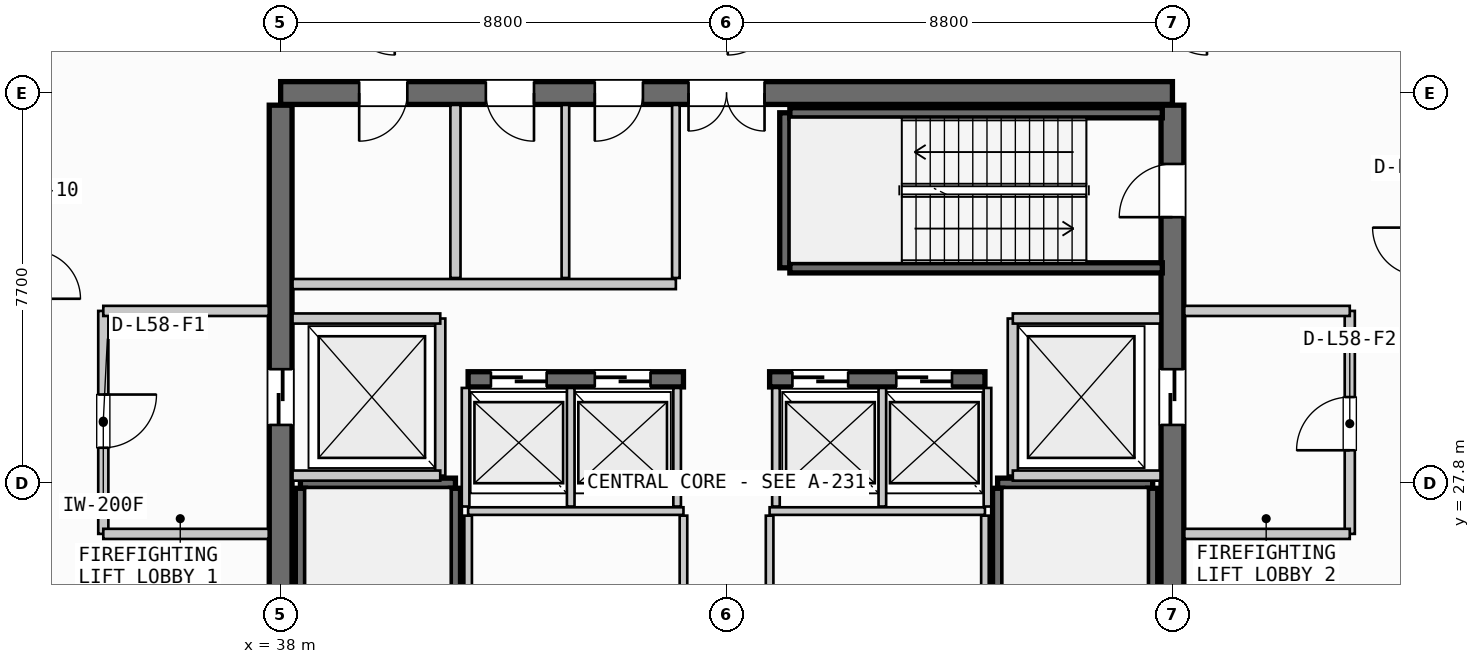
"""IFC4 building model, lengths in metres.
Left out: names, types, materials, properties, quantities, classifications, styles, units other than length and angle.
Written with IfcOpenShell. Run it as: python <this file> out.ifc"""

import sys

from ifc_helpers import new_model, si_unit, direction, frame, frame_2d, origin, place, context, subcontext, project, spatial, rectangle, extrude, source, transform, mapped, element, fill, save


model = new_model("IFC4")
c1 = context("Model", 3, precision=1e-05, world=origin(), true_north=direction((0.0, 1.0)))
c2 = subcontext(c1, "Body", "Model", "MODEL_VIEW")
j1 = project(units=[si_unit("LENGTHUNIT", "METRE"), si_unit("PLANEANGLEUNIT", "RADIAN")], contexts=[c1])
p1 = place(None, origin())
s1 = spatial("IfcSite", under=j1, at=p1, CompositionType="ELEMENT")
p2 = place(p1, origin())
s2 = spatial("IfcBuilding", under=s1, at=p2, CompositionType="ELEMENT")
p3 = place(p2, frame((0.0, 0.0, 223.6)))
s3 = spatial("IfcBuildingStorey", under=s2, at=p3, CompositionType="ELEMENT", Elevation=223.6)
p4 = place(p3, frame((55.6, 35.5, 0.0), z_axis=(0.0, 0.0, 1.0), x_axis=(-1.0, 0.0, 0.0)))
e1 = element("IfcWall", 1, at=p4, inside=s3, PredefinedType="SHEAR", context=c2, shape_type="SweptSolid", body=[
    extrude(rectangle(XDim=17.6, YDim=0.45, at=frame_2d((8.8, 0.0))), origin(), (0.0, 0.0, 1.0), 4.38),
])
p5 = place(p4, frame((8.05, 0.0, 0.0)))
e2 = element("IfcOpeningElement", 2, at=p5, cuts=e1, PredefinedType="OPENING", context=c2, shape_type="SweptSolid", body=[
    extrude(rectangle(XDim=1.5, YDim=2.2, at=frame_2d((0.75, 1.1))), frame((0.0, 0.235, 0.0), z_axis=(0.0, -1.0, 0.0), x_axis=(1.0, 0.0, 0.0)), (0.0, 0.0, 1.0), 0.47),
])
p6 = place(p4, frame((15.1, 0.0, 0.0)))
e3 = element("IfcOpeningElement", 3, at=p6, cuts=e1, PredefinedType="OPENING", context=c2, shape_type="SweptSolid", body=[
    extrude(rectangle(XDim=0.95, YDim=2.15, at=frame_2d((0.475, 1.075))), frame((0.0, 0.235, 0.0), z_axis=(0.0, -1.0, 0.0), x_axis=(1.0, 0.0, 0.0)), (0.0, 0.0, 1.0), 0.47),
])
p7 = place(p4, frame((12.6, 0.0, 0.0)))
e4 = element("IfcOpeningElement", 4, at=p7, cuts=e1, PredefinedType="OPENING", context=c2, shape_type="SweptSolid", body=[
    extrude(rectangle(XDim=0.95, YDim=2.15, at=frame_2d((0.475, 1.075))), frame((0.0, 0.235, 0.0), z_axis=(0.0, -1.0, 0.0), x_axis=(1.0, 0.0, 0.0)), (0.0, 0.0, 1.0), 0.47),
])
p8 = place(p4, frame((10.45, 0.0, 0.0)))
e5 = element("IfcOpeningElement", 5, at=p8, cuts=e1, PredefinedType="OPENING", context=c2, shape_type="SweptSolid", body=[
    extrude(rectangle(XDim=0.95, YDim=2.15, at=frame_2d((0.475, 1.075))), frame((0.0, 0.235, 0.0), z_axis=(0.0, -1.0, 0.0), x_axis=(1.0, 0.0, 0.0)), (0.0, 0.0, 1.0), 0.47),
])
p9 = place(p3, frame((38.0, 35.26, 0.0), z_axis=(0.0, 0.0, 1.0), x_axis=(0.0, -1.0, 0.0)))
e6 = element("IfcWall", 6, at=p9, inside=s3, PredefinedType="SHEAR", context=c2, shape_type="SweptSolid", body=[
    extrude(rectangle(XDim=14.92, YDim=0.45, at=frame_2d((7.46, 0.0))), origin(), (0.0, 0.0, 1.0), 4.38),
])
p10 = place(p9, frame((5.21, 0.0, 0.0)))
e7 = element("IfcOpeningElement", 7, at=p10, cuts=e6, PredefinedType="OPENING", context=c2, shape_type="SweptSolid", body=[
    extrude(rectangle(XDim=1.1, YDim=2.2, at=frame_2d((0.55, 1.1))), frame((0.0, 0.235, 0.0), z_axis=(0.0, -1.0, 0.0), x_axis=(1.0, 0.0, 0.0)), (0.0, 0.0, 1.0), 0.47),
])
p11 = place(p3, frame((55.6, 20.34, 0.0), z_axis=(0.0, 0.0, 1.0), x_axis=(0.0, 1.0, 0.0)))
e8 = element("IfcWall", 8, at=p11, inside=s3, PredefinedType="SHEAR", context=c2, shape_type="SweptSolid", body=[
    extrude(rectangle(XDim=14.92, YDim=0.45, at=frame_2d((7.46, 0.0))), origin(), (0.0, 0.0, 1.0), 4.38),
])
p12 = place(p11, frame((12.71, 0.0, 0.0)))
e9 = element("IfcOpeningElement", 9, at=p12, cuts=e8, PredefinedType="OPENING", context=c2, shape_type="SweptSolid", body=[
    extrude(rectangle(XDim=1.05, YDim=2.15, at=frame_2d((0.525, 1.075))), frame((0.0, 0.235, 0.0), z_axis=(0.0, -1.0, 0.0), x_axis=(1.0, 0.0, 0.0)), (0.0, 0.0, 1.0), 0.47),
])
p13 = place(p11, frame((8.61, 0.0, 0.0)))
e10 = element("IfcOpeningElement", 10, at=p13, cuts=e8, PredefinedType="OPENING", context=c2, shape_type="SweptSolid", body=[
    extrude(rectangle(XDim=1.1, YDim=2.2, at=frame_2d((0.55, 1.1))), frame((0.0, 0.235, 0.0), z_axis=(0.0, -1.0, 0.0), x_axis=(1.0, 0.0, 0.0)), (0.0, 0.0, 1.0), 0.47),
])
p14 = place(p3, frame((41.7, 29.85, 0.0), z_axis=(0.0, 0.0, 1.0), x_axis=(1.0, 0.0, 0.0)))
e11 = element("IfcWall", 11, at=p14, inside=s3, PredefinedType="SHEAR", context=c2, shape_type="SweptSolid", body=[
    extrude(rectangle(XDim=4.25, YDim=0.3, at=frame_2d((2.125, 0.0))), origin(), (0.0, 0.0, 1.0), 4.38),
])
p15 = place(p14, frame((0.45, 0.0, 0.0)))
e12 = element("IfcOpeningElement", 12, at=p15, cuts=e11, PredefinedType="OPENING", context=c2, shape_type="SweptSolid", body=[
    extrude(rectangle(XDim=1.1, YDim=2.2, at=frame_2d((0.55, 1.1))), frame((0.0, 0.16, 0.0), z_axis=(0.0, -1.0, 0.0), x_axis=(1.0, 0.0, 0.0)), (0.0, 0.0, 1.0), 0.32),
])
p16 = place(p14, frame((2.5, 0.0, 0.0)))
e13 = element("IfcOpeningElement", 13, at=p16, cuts=e11, PredefinedType="OPENING", context=c2, shape_type="SweptSolid", body=[
    extrude(rectangle(XDim=1.1, YDim=2.2, at=frame_2d((0.55, 1.1))), frame((0.0, 0.16, 0.0), z_axis=(0.0, -1.0, 0.0), x_axis=(1.0, 0.0, 0.0)), (0.0, 0.0, 1.0), 0.32),
])
p17 = place(p3, frame((47.65, 29.85, 0.0), z_axis=(0.0, 0.0, 1.0), x_axis=(1.0, 0.0, 0.0)))
e14 = element("IfcWall", 14, at=p17, inside=s3, PredefinedType="SHEAR", context=c2, shape_type="SweptSolid", body=[
    extrude(rectangle(XDim=4.25, YDim=0.3, at=frame_2d((2.125, 0.0))), origin(), (0.0, 0.0, 1.0), 4.38),
])
p18 = place(p17, frame((0.45, 0.0, 0.0)))
e15 = element("IfcOpeningElement", 15, at=p18, cuts=e14, PredefinedType="OPENING", context=c2, shape_type="SweptSolid", body=[
    extrude(rectangle(XDim=1.1, YDim=2.2, at=frame_2d((0.55, 1.1))), frame((0.0, 0.16, 0.0), z_axis=(0.0, -1.0, 0.0), x_axis=(1.0, 0.0, 0.0)), (0.0, 0.0, 1.0), 0.32),
])
p19 = place(p17, frame((2.5, 0.0, 0.0)))
e16 = element("IfcOpeningElement", 16, at=p19, cuts=e14, PredefinedType="OPENING", context=c2, shape_type="SweptSolid", body=[
    extrude(rectangle(XDim=1.1, YDim=2.2, at=frame_2d((0.55, 1.1))), frame((0.0, 0.16, 0.0), z_axis=(0.0, -1.0, 0.0), x_axis=(1.0, 0.0, 0.0)), (0.0, 0.0, 1.0), 0.32),
])
p20 = place(p3, frame((38.39, 27.8, 0.0), z_axis=(0.0, 0.0, 1.0), x_axis=(1.0, 0.0, 0.0)))
e17 = element("IfcWall", 17, at=p20, inside=s3, PredefinedType="SHEAR", context=c2, shape_type="SweptSolid", body=[
    extrude(rectangle(XDim=3.06, YDim=0.2, at=frame_2d((1.53, 0.0))), origin(), (0.0, 0.0, 1.0), 4.38),
])
for number, where, z_axis, x_axis in (
    (18, (41.45, 27.7, 0.0), (0.0, 0.0, 1.0), (0.0, -1.0, 0.0)),
    (19, (38.39, 20.35, 0.0), (0.0, 0.0, 1.0), (0.0, 1.0, 0.0)),
):
    element("IfcWall", number, at=place(p3, frame(where, z_axis=z_axis, x_axis=x_axis)), inside=s3, PredefinedType="SHEAR", context=c2, shape_type="SweptSolid", body=[
        extrude(rectangle(XDim=7.35, YDim=0.2, at=frame_2d((3.675, 0.0))), origin(), (0.0, 0.0, 1.0), 4.38),
    ])
p21 = place(p3, frame((52.15, 27.8, 0.0), z_axis=(0.0, 0.0, 1.0), x_axis=(1.0, 0.0, 0.0)))
e20 = element("IfcWall", 20, at=p21, inside=s3, PredefinedType="SHEAR", context=c2, shape_type="SweptSolid", body=[
    extrude(rectangle(XDim=3.06, YDim=0.2, at=frame_2d((1.53, 0.0))), origin(), (0.0, 0.0, 1.0), 4.38),
])
for number, where, z_axis, x_axis in (
    (21, (55.21, 27.7, 0.0), (0.0, 0.0, 1.0), (0.0, -1.0, 0.0)),
    (22, (52.15, 20.35, 0.0), (0.0, 0.0, 1.0), (0.0, 1.0, 0.0)),
):
    element("IfcWall", number, at=place(p3, frame(where, z_axis=z_axis, x_axis=x_axis)), inside=s3, PredefinedType="SHEAR", context=c2, shape_type="SweptSolid", body=[
        extrude(rectangle(XDim=7.35, YDim=0.2, at=frame_2d((3.675, 0.0))), origin(), (0.0, 0.0, 1.0), 4.38),
    ])
p22 = place(p3, frame((47.95, 32.05, 0.0), z_axis=(0.0, 0.0, 1.0), x_axis=(0.0, 1.0, 0.0)))
e23 = element("IfcWall", 23, at=p22, inside=s3, PredefinedType="SHEAR", context=c2, shape_type="SweptSolid", body=[
    extrude(rectangle(XDim=3.06, YDim=0.2, at=frame_2d((1.53, 0.0))), origin(), (0.0, 0.0, 1.0), 4.38),
])
for number, where, z_axis, x_axis in (
    (24, (48.05, 35.11, 0.0), (0.0, 0.0, 1.0), (1.0, 0.0, 0.0)),
    (25, (55.4, 32.05, 0.0), (0.0, 0.0, 1.0), (-1.0, 0.0, 0.0)),
):
    element("IfcWall", number, at=place(p3, frame(where, z_axis=z_axis, x_axis=x_axis)), inside=s3, PredefinedType="SHEAR", context=c2, shape_type="SweptSolid", body=[
        extrude(rectangle(XDim=7.35, YDim=0.2, at=frame_2d((3.675, 0.0))), origin(), (0.0, 0.0, 1.0), 4.38),
    ])
p23 = place(p3, frame((41.15, 27.95, 0.0), z_axis=(0.0, 0.0, 1.0), x_axis=(0.0, 1.0, 0.0)))
e26 = element("IfcWall", 26, at=p23, inside=s3, PredefinedType="PARTITIONING", context=c2, shape_type="SweptSolid", body=[
    extrude(rectangle(XDim=3.1, YDim=0.2, at=frame_2d((1.55, 0.0))), origin(), (0.0, 0.0, 1.0), 2.455),
])
for number, where, z_axis, x_axis in (
    (27, (38.235, 27.95, 0.0), (0.0, 0.0, 1.0), (1.0, 0.0, 0.0)),
    (28, (38.235, 31.05, 0.0), (0.0, 0.0, 1.0), (1.0, 0.0, 0.0)),
):
    element("IfcWall", number, at=place(p3, frame(where, z_axis=z_axis, x_axis=x_axis)), inside=s3, PredefinedType="PARTITIONING", context=c2, shape_type="SweptSolid", body=[
        extrude(rectangle(XDim=2.915, YDim=0.2, at=frame_2d((1.458, 0.0))), origin(), (0.0, 0.0, 1.0), 2.455),
    ])
p24 = place(p3, frame((34.5, 31.2, 0.0), z_axis=(0.0, 0.0, 1.0), x_axis=(0.0, -1.0, 0.0)))
e29 = element("IfcWall", 29, at=p24, inside=s3, PredefinedType="PARTITIONING", context=c2, shape_type="SweptSolid", body=[
    extrude(rectangle(XDim=4.4, YDim=0.2, at=frame_2d((2.2, 0.0))), origin(), (0.0, 0.0, 1.0), 2.455),
])
p25 = place(p24, frame((1.65, 0.0, 0.0)))
e30 = element("IfcOpeningElement", 30, at=p25, cuts=e29, PredefinedType="OPENING", context=c2, shape_type="SweptSolid", body=[
    extrude(rectangle(XDim=1.05, YDim=2.15, at=frame_2d((0.525, 1.075))), frame((0.0, 0.11, 0.0), z_axis=(0.0, -1.0, 0.0), x_axis=(1.0, 0.0, 0.0)), (0.0, 0.0, 1.0), 0.22),
])
for number, where, z_axis, x_axis in (
    (31, (34.5, 26.8, 0.0), (0.0, 0.0, 1.0), (1.0, 0.0, 0.0)),
    (32, (34.5, 31.2, 0.0), (0.0, 0.0, 1.0), (1.0, 0.0, 0.0)),
):
    element("IfcWall", number, at=place(p3, frame(where, z_axis=z_axis, x_axis=x_axis)), inside=s3, PredefinedType="PARTITIONING", context=c2, shape_type="SweptSolid", body=[
        extrude(rectangle(XDim=3.265, YDim=0.2, at=frame_2d((1.632, 0.0))), origin(), (0.0, 0.0, 1.0), 2.455),
    ])
p26 = place(p3, frame((52.45, 27.95, 0.0), z_axis=(0.0, 0.0, 1.0), x_axis=(0.0, 1.0, 0.0)))
e33 = element("IfcWall", 33, at=p26, inside=s3, PredefinedType="PARTITIONING", context=c2, shape_type="SweptSolid", body=[
    extrude(rectangle(XDim=3.1, YDim=0.2, at=frame_2d((1.55, 0.0))), origin(), (0.0, 0.0, 1.0), 2.455),
])
for number, where, z_axis, x_axis in (
    (34, (52.45, 27.95, 0.0), (0.0, 0.0, 1.0), (1.0, 0.0, 0.0)),
    (35, (52.45, 31.05, 0.0), (0.0, 0.0, 1.0), (1.0, 0.0, 0.0)),
):
    element("IfcWall", number, at=place(p3, frame(where, z_axis=z_axis, x_axis=x_axis)), inside=s3, PredefinedType="PARTITIONING", context=c2, shape_type="SweptSolid", body=[
        extrude(rectangle(XDim=2.915, YDim=0.2, at=frame_2d((1.458, 0.0))), origin(), (0.0, 0.0, 1.0), 2.455),
    ])
p27 = place(p3, frame((59.1, 26.8, 0.0), z_axis=(0.0, 0.0, 1.0), x_axis=(0.0, 1.0, 0.0)))
e36 = element("IfcWall", 36, at=p27, inside=s3, PredefinedType="PARTITIONING", context=c2, shape_type="SweptSolid", body=[
    extrude(rectangle(XDim=4.4, YDim=0.2, at=frame_2d((2.2, 0.0))), origin(), (0.0, 0.0, 1.0), 2.455),
])
p28 = place(p27, frame((1.65, 0.0, 0.0)))
e37 = element("IfcOpeningElement", 37, at=p28, cuts=e36, PredefinedType="OPENING", context=c2, shape_type="SweptSolid", body=[
    extrude(rectangle(XDim=1.05, YDim=2.15, at=frame_2d((0.525, 1.075))), frame((0.0, 0.11, 0.0), z_axis=(0.0, -1.0, 0.0), x_axis=(1.0, 0.0, 0.0)), (0.0, 0.0, 1.0), 0.22),
])
for number, where, z_axis, x_axis in (
    (38, (55.835, 26.8, 0.0), (0.0, 0.0, 1.0), (1.0, 0.0, 0.0)),
    (39, (55.835, 31.2, 0.0), (0.0, 0.0, 1.0), (1.0, 0.0, 0.0)),
):
    element("IfcWall", number, at=place(p3, frame(where, z_axis=z_axis, x_axis=x_axis)), inside=s3, PredefinedType="PARTITIONING", context=c2, shape_type="SweptSolid", body=[
        extrude(rectangle(XDim=3.265, YDim=0.2, at=frame_2d((1.633, 0.0))), origin(), (0.0, 0.0, 1.0), 2.455),
    ])
for number, where, z_axis, x_axis in (
    (40, (41.7, 27.25, 0.0), (0.0, 0.0, 1.0), (1.0, 0.0, 0.0)),
    (41, (47.65, 27.25, 0.0), (0.0, 0.0, 1.0), (1.0, 0.0, 0.0)),
):
    element("IfcWall", number, at=place(p3, frame(where, z_axis=z_axis, x_axis=x_axis)), inside=s3, PredefinedType="PARTITIONING", context=c2, shape_type="SweptSolid", body=[
        extrude(rectangle(XDim=4.25, YDim=0.15, at=frame_2d((2.125, 0.0))), origin(), (0.0, 0.0, 1.0), 2.455),
    ])
for number, where, z_axis, x_axis in (
    (42, (41.7, 24.92, 0.0), (0.0, 0.0, 1.0), (0.0, 1.0, 0.0)),
    (43, (45.95, 24.92, 0.0), (0.0, 0.0, 1.0), (0.0, 1.0, 0.0)),
    (44, (47.65, 24.92, 0.0), (0.0, 0.0, 1.0), (0.0, 1.0, 0.0)),
    (45, (51.9, 24.92, 0.0), (0.0, 0.0, 1.0), (0.0, 1.0, 0.0)),
):
    element("IfcWall", number, at=place(p3, frame(where, z_axis=z_axis, x_axis=x_axis)), inside=s3, PredefinedType="PARTITIONING", context=c2, shape_type="SweptSolid", body=[
        extrude(rectangle(XDim=2.24, YDim=0.15, at=frame_2d((1.12, 0.0))), origin(), (0.0, 0.0, 1.0), 2.455),
    ])
for number, where, z_axis, x_axis in (
    (46, (41.65, 27.34, 0.0), (0.0, 0.0, 1.0), (0.0, 1.0, 0.0)),
    (47, (43.725, 27.34, 0.0), (0.0, 0.0, 1.0), (0.0, 1.0, 0.0)),
    (48, (45.825, 27.34, 0.0), (0.0, 0.0, 1.0), (0.0, 1.0, 0.0)),
    (49, (47.775, 27.34, 0.0), (0.0, 0.0, 1.0), (0.0, 1.0, 0.0)),
    (50, (49.875, 27.34, 0.0), (0.0, 0.0, 1.0), (0.0, 1.0, 0.0)),
    (51, (51.95, 27.34, 0.0), (0.0, 0.0, 1.0), (0.0, 1.0, 0.0)),
):
    element("IfcWall", number, at=place(p3, frame(where, z_axis=z_axis, x_axis=x_axis)), inside=s3, PredefinedType="PARTITIONING", context=c2, shape_type="SweptSolid", body=[
        extrude(rectangle(XDim=2.34, YDim=0.15, at=frame_2d((1.17, 0.0))), origin(), (0.0, 0.0, 1.0), 2.455),
    ])
p29 = place(p3, frame((41.45, 31.85, 0.0), z_axis=(0.0, 0.0, 1.0), x_axis=(0.0, 1.0, 0.0)))
e52 = element("IfcWall", 52, at=p29, inside=s3, PredefinedType="PARTITIONING", context=c2, shape_type="SweptSolid", body=[
    extrude(rectangle(XDim=3.415, YDim=0.2, at=frame_2d((1.708, 0.0))), origin(), (0.0, 0.0, 1.0), 2.455),
])
p30 = place(p3, frame((38.235, 31.73, 0.0), z_axis=(0.0, 0.0, 1.0), x_axis=(1.0, 0.0, 0.0)))
e53 = element("IfcWall", 53, at=p30, inside=s3, PredefinedType="PARTITIONING", context=c2, shape_type="SweptSolid", body=[
    extrude(rectangle(XDim=7.565, YDim=0.2, at=frame_2d((3.782, 0.0))), origin(), (0.0, 0.0, 1.0), 2.455),
])
p31 = place(p3, frame((45.8, 31.85, 0.0), z_axis=(0.0, 0.0, 1.0), x_axis=(0.0, 1.0, 0.0)))
e54 = element("IfcWall", 54, at=p31, inside=s3, PredefinedType="PARTITIONING", context=c2, shape_type="SweptSolid", body=[
    extrude(rectangle(XDim=3.415, YDim=0.15, at=frame_2d((1.708, 0.0))), origin(), (0.0, 0.0, 1.0), 2.455),
])
p32 = place(p3, frame((43.62, 31.85, 0.0), z_axis=(0.0, 0.0, 1.0), x_axis=(0.0, 1.0, 0.0)))
e55 = element("IfcWall", 55, at=p32, inside=s3, PredefinedType="PLUMBINGWALL", context=c2, shape_type="SweptSolid", body=[
    extrude(rectangle(XDim=3.415, YDim=0.15, at=frame_2d((1.708, 0.0))), origin(), (0.0, 0.0, 1.0), 2.455),
])
m1 = source(origin(), c2, "Body", "SweptSolid", [
    extrude(rectangle(XDim=1.05, YDim=2.15, at=frame_2d((0.525, 1.075))), frame((0.0, 0.025, 0.0), z_axis=(0.0, -1.0, 0.0), x_axis=(1.0, 0.0, 0.0)), (0.0, 0.0, 1.0), 0.05),
])
p33 = place(p12, origin())
e56 = element("IfcDoor", 56, at=p33, inside=s3, OperationType="SINGLE_SWING_LEFT", PredefinedType="DOOR", context=c2, shape_type="MappedRepresentation", body=[
    mapped(m1, transform((0.0, 0.0, 0.0), scale=1.0)),
])
fill(e9, e56)
m2 = source(origin(), c2, "Body", "SweptSolid", [
    extrude(rectangle(XDim=1.5, YDim=2.2, at=frame_2d((0.75, 1.1))), frame((0.0, 0.025, 0.0), z_axis=(0.0, -1.0, 0.0), x_axis=(1.0, 0.0, 0.0)), (0.0, 0.0, 1.0), 0.05),
])
p34 = place(p5, origin())
e57 = element("IfcDoor", 57, at=p34, inside=s3, OperationType="DOUBLE_DOOR_SINGLE_SWING", PredefinedType="DOOR", context=c2, shape_type="MappedRepresentation", body=[
    mapped(m2, transform((0.0, 0.0, 0.0), scale=1.0)),
])
fill(e2, e57)
m3 = source(origin(), c2, "Body", "SweptSolid", [
    extrude(rectangle(XDim=1.1, YDim=2.2, at=frame_2d((0.55, 1.1))), frame((0.0, 0.025, 0.0), z_axis=(0.0, -1.0, 0.0), x_axis=(1.0, 0.0, 0.0)), (0.0, 0.0, 1.0), 0.05),
])
p35 = place(p10, origin())
e58 = element("IfcDoor", 58, at=p35, inside=s3, OperationType="SLIDING_TO_LEFT", PredefinedType="DOOR", context=c2, shape_type="MappedRepresentation", body=[
    mapped(m3, transform((0.0, 0.0, 0.0), scale=1.0)),
])
fill(e7, e58)
p36 = place(p13, origin())
e59 = element("IfcDoor", 59, at=p36, inside=s3, OperationType="SLIDING_TO_RIGHT", PredefinedType="DOOR", context=c2, shape_type="MappedRepresentation", body=[
    mapped(m3, transform((0.0, 0.0, 0.0), scale=1.0)),
])
fill(e10, e59)
p37 = place(p15, origin())
e60 = element("IfcDoor", 60, at=p37, inside=s3, OperationType="SLIDING_TO_LEFT", PredefinedType="DOOR", context=c2, shape_type="MappedRepresentation", body=[
    mapped(m3, transform((0.0, 0.0, 0.0), scale=1.0)),
])
fill(e12, e60)
p38 = place(p16, origin())
e61 = element("IfcDoor", 61, at=p38, inside=s3, OperationType="SLIDING_TO_LEFT", PredefinedType="DOOR", context=c2, shape_type="MappedRepresentation", body=[
    mapped(m3, transform((0.0, 0.0, 0.0), scale=1.0)),
])
fill(e13, e61)
p39 = place(p18, origin())
e62 = element("IfcDoor", 62, at=p39, inside=s3, OperationType="SLIDING_TO_LEFT", PredefinedType="DOOR", context=c2, shape_type="MappedRepresentation", body=[
    mapped(m3, transform((0.0, 0.0, 0.0), scale=1.0)),
])
fill(e15, e62)
p40 = place(p19, origin())
e63 = element("IfcDoor", 63, at=p40, inside=s3, OperationType="SLIDING_TO_LEFT", PredefinedType="DOOR", context=c2, shape_type="MappedRepresentation", body=[
    mapped(m3, transform((0.0, 0.0, 0.0), scale=1.0)),
])
fill(e16, e63)
m4 = source(origin(), c2, "Body", "SweptSolid", [
    extrude(rectangle(XDim=0.95, YDim=2.15, at=frame_2d((0.475, 1.075))), frame((0.0, 0.025, 0.0), z_axis=(0.0, -1.0, 0.0), x_axis=(1.0, 0.0, 0.0)), (0.0, 0.0, 1.0), 0.05),
])
p41 = place(p6, origin())
e64 = element("IfcDoor", 64, at=p41, inside=s3, OperationType="SINGLE_SWING_RIGHT", PredefinedType="DOOR", context=c2, shape_type="MappedRepresentation", body=[
    mapped(m4, transform((0.0, 0.0, 0.0), scale=1.0)),
])
fill(e3, e64)
p42 = place(p7, origin())
e65 = element("IfcDoor", 65, at=p42, inside=s3, OperationType="SINGLE_SWING_LEFT", PredefinedType="DOOR", context=c2, shape_type="MappedRepresentation", body=[
    mapped(m4, transform((0.0, 0.0, 0.0), scale=1.0)),
])
fill(e4, e65)
p43 = place(p8, origin())
e66 = element("IfcDoor", 66, at=p43, inside=s3, OperationType="SINGLE_SWING_RIGHT", PredefinedType="DOOR", context=c2, shape_type="MappedRepresentation", body=[
    mapped(m4, transform((0.0, 0.0, 0.0), scale=1.0)),
])
fill(e5, e66)
p44 = place(p25, origin())
e67 = element("IfcDoor", 67, at=p44, inside=s3, OperationType="SINGLE_SWING_LEFT", PredefinedType="DOOR", context=c2, shape_type="MappedRepresentation", body=[
    mapped(m1, transform((0.0, 0.0, 0.0), scale=1.0)),
])
fill(e30, e67)
p45 = place(p28, origin())
e68 = element("IfcDoor", 68, at=p45, inside=s3, OperationType="SINGLE_SWING_LEFT", PredefinedType="DOOR", context=c2, shape_type="MappedRepresentation", body=[
    mapped(m1, transform((0.0, 0.0, 0.0), scale=1.0)),
])
fill(e37, e68)
save(model, sys.argv[1])
